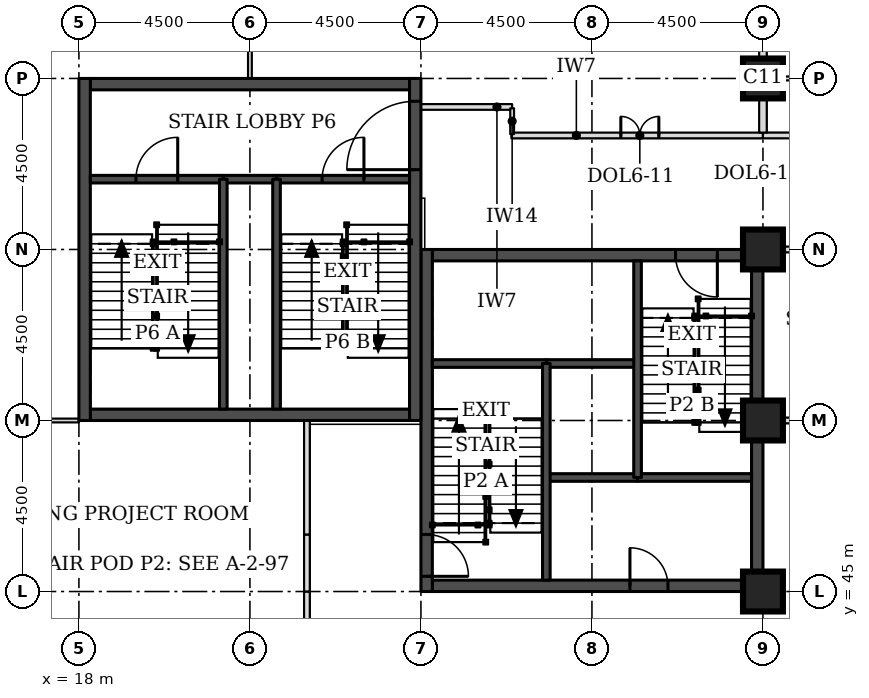
"""IFC4 building model, lengths in metres.
Left out: names, types, materials, properties, quantities, classifications, styles, units other than length and angle.
Written with IfcOpenShell. Run it as: python <this file> out.ifc"""

import sys

from ifc_helpers import new_model, si_unit, direction, frame, frame_2d, origin, origin_2d, place, context, subcontext, project, spatial, rectangle, extrude, element, fill, save


model = new_model("IFC4")
c1 = context("Model", 3, precision=1e-05, world=origin(), true_north=direction((0.0, 1.0)))
c2 = subcontext(c1, "Body", "Model", "MODEL_VIEW")
j1 = project(units=[si_unit("LENGTHUNIT", "METRE"), si_unit("PLANEANGLEUNIT", "RADIAN")], contexts=[c1])
p1 = place(None, origin())
s1 = spatial("IfcSite", under=j1, at=p1, CompositionType="ELEMENT")
p2 = place(p1, origin())
s2 = spatial("IfcBuilding", under=s1, at=p2, CompositionType="ELEMENT")
p3 = place(p2, frame((0.0, 0.0, 119.6)))
s3 = spatial("IfcBuildingStorey", under=s2, at=p3, CompositionType="ELEMENT", Elevation=119.6)
for number, where, z_axis, x_axis in (
    (1, (36.0, 45.0, 0.0), (0.0, 0.0, 1.0), (1.0, 0.0, 0.0)),
    (2, (36.0, 49.5, 0.0), (0.0, 0.0, 1.0), (1.0, 0.0, 0.0)),
    (3, (36.0, 54.0, 0.0), (0.0, 0.0, 1.0), (1.0, 0.0, 0.0)),
    (4, (36.0, 58.5, 0.0), (0.0, 0.0, 1.0), (1.0, 0.0, 0.0)),
):
    element("IfcColumn", number, at=place(p3, frame(where, z_axis=z_axis, x_axis=x_axis)), inside=s3, PredefinedType="COLUMN", context=c2, shape_type="SweptSolid", body=[
        extrude(rectangle(XDim=1.05, YDim=1.05, at=origin_2d()), origin(), (0.0, 0.0, 1.0), 3.7),
    ])
p4 = place(p3, frame((27.3, 45.15, 0.0), z_axis=(0.0, 0.0, 1.0), x_axis=(1.0, 0.0, 0.0)))
e5 = element("IfcWall", 5, at=p4, inside=s3, PredefinedType="SHEAR", context=c2, shape_type="SweptSolid", body=[
    extrude(rectangle(XDim=8.4, YDim=0.3, at=frame_2d((4.2, 0.0))), origin(), (0.0, 0.0, 1.0), 3.7),
])
p5 = place(p4, frame((5.2, 0.0, 0.0)))
e6 = element("IfcOpeningElement", 6, at=p5, cuts=e5, PredefinedType="OPENING", context=c2, shape_type="SweptSolid", body=[
    extrude(rectangle(XDim=1.0, YDim=2.1, at=frame_2d((0.5, 1.05))), frame((0.0, 0.16, 0.0), z_axis=(0.0, -1.0, 0.0), x_axis=(1.0, 0.0, 0.0)), (0.0, 0.0, 1.0), 0.32),
])
p6 = place(p3, frame((27.3, 53.85, 0.0), z_axis=(0.0, 0.0, 1.0), x_axis=(1.0, 0.0, 0.0)))
e7 = element("IfcWall", 7, at=p6, inside=s3, PredefinedType="SHEAR", context=c2, shape_type="SweptSolid", body=[
    extrude(rectangle(XDim=8.4, YDim=0.3, at=frame_2d((4.2, 0.0))), origin(), (0.0, 0.0, 1.0), 3.7),
])
p7 = place(p6, frame((6.4, 0.0, 0.0)))
e8 = element("IfcOpeningElement", 8, at=p7, cuts=e7, PredefinedType="OPENING", context=c2, shape_type="SweptSolid", body=[
    extrude(rectangle(XDim=1.1, YDim=2.1, at=frame_2d((0.55, 1.05))), frame((0.0, 0.16, 0.0), z_axis=(0.0, -1.0, 0.0), x_axis=(1.0, 0.0, 0.0)), (0.0, 0.0, 1.0), 0.32),
])
p8 = place(p3, frame((27.15, 45.0, 0.0), z_axis=(0.0, 0.0, 1.0), x_axis=(0.0, 1.0, 0.0)))
e9 = element("IfcWall", 9, at=p8, inside=s3, PredefinedType="SHEAR", context=c2, shape_type="SweptSolid", body=[
    extrude(rectangle(XDim=9.0, YDim=0.3, at=frame_2d((4.5, 0.0))), origin(), (0.0, 0.0, 1.0), 3.7),
])
p9 = place(p8, frame((0.4, 0.0, 0.0)))
e10 = element("IfcOpeningElement", 10, at=p9, cuts=e9, PredefinedType="OPENING", context=c2, shape_type="SweptSolid", body=[
    extrude(rectangle(XDim=1.1, YDim=2.1, at=frame_2d((0.55, 1.05))), frame((0.0, 0.16, 0.0), z_axis=(0.0, -1.0, 0.0), x_axis=(1.0, 0.0, 0.0)), (0.0, 0.0, 1.0), 0.32),
])
p10 = place(p3, frame((35.85, 45.0, 0.0), z_axis=(0.0, 0.0, 1.0), x_axis=(0.0, 1.0, 0.0)))
e11 = element("IfcWall", 11, at=p10, inside=s3, PredefinedType="SHEAR", context=c2, shape_type="SweptSolid", body=[
    extrude(rectangle(XDim=9.0, YDim=0.3, at=frame_2d((4.5, 0.0))), origin(), (0.0, 0.0, 1.0), 3.7),
])
for number, where, z_axis, x_axis in (
    (12, (18.3, 49.65, 0.0), (0.0, 0.0, 1.0), (1.0, 0.0, 0.0)),
    (13, (18.3, 58.35, 0.0), (0.0, 0.0, 1.0), (1.0, 0.0, 0.0)),
):
    element("IfcWall", number, at=place(p3, frame(where, z_axis=z_axis, x_axis=x_axis)), inside=s3, PredefinedType="SHEAR", context=c2, shape_type="SweptSolid", body=[
        extrude(rectangle(XDim=8.4, YDim=0.3, at=frame_2d((4.2, 0.0))), origin(), (0.0, 0.0, 1.0), 3.7),
    ])
p11 = place(p3, frame((18.15, 49.5, 0.0), z_axis=(0.0, 0.0, 1.0), x_axis=(0.0, 1.0, 0.0)))
e14 = element("IfcWall", 14, at=p11, inside=s3, PredefinedType="SHEAR", context=c2, shape_type="SweptSolid", body=[
    extrude(rectangle(XDim=9.0, YDim=0.3, at=frame_2d((4.5, 0.0))), origin(), (0.0, 0.0, 1.0), 3.7),
])
p12 = place(p3, frame((26.85, 49.5, 0.0), z_axis=(0.0, 0.0, 1.0), x_axis=(0.0, 1.0, 0.0)))
e15 = element("IfcWall", 15, at=p12, inside=s3, PredefinedType="SHEAR", context=c2, shape_type="SweptSolid", body=[
    extrude(rectangle(XDim=9.0, YDim=0.3, at=frame_2d((4.5, 0.0))), origin(), (0.0, 0.0, 1.0), 3.7),
])
p13 = place(p12, frame((6.6, 0.0, 0.0)))
e16 = element("IfcOpeningElement", 16, at=p13, cuts=e15, PredefinedType="OPENING", context=c2, shape_type="SweptSolid", body=[
    extrude(rectangle(XDim=1.8, YDim=2.1, at=frame_2d((0.9, 1.05))), frame((0.0, 0.16, 0.0), z_axis=(0.0, -1.0, 0.0), x_axis=(1.0, 0.0, 0.0)), (0.0, 0.0, 1.0), 0.32),
])
p14 = place(p3, frame((17.761, 63.751, 0.0), z_axis=(0.0, 0.0, 1.0), x_axis=(-0.707106781187, -0.707106781187, 0.0)))
e17 = element("IfcWall", 17, at=p14, inside=s3, PredefinedType="STANDARD", context=c2, shape_type="SweptSolid", body=[
    extrude(rectangle(XDim=7.089, YDim=0.35, at=frame_2d((3.544, 0.0))), origin(), (0.0, 0.0, 1.0), 3.525),
])
p15 = place(p14, frame((1.894, 0.0, 0.9)))
e18 = element("IfcOpeningElement", 18, at=p15, cuts=e17, PredefinedType="OPENING", context=c2, shape_type="SweptSolid", body=[
    extrude(rectangle(XDim=3.3, YDim=1.9, at=frame_2d((1.65, 0.95))), frame((0.0, 0.185, 0.0), z_axis=(0.0, -1.0, 0.0), x_axis=(1.0, 0.0, 0.0)), (0.0, 0.0, 1.0), 0.37),
])
p16 = place(p3, frame((12.749, 44.761, 0.0), z_axis=(0.0, 0.0, 1.0), x_axis=(0.707106781187, -0.707106781187, 0.0)))
e19 = element("IfcWall", 19, at=p16, inside=s3, PredefinedType="STANDARD", context=c2, shape_type="SweptSolid", body=[
    extrude(rectangle(XDim=7.089, YDim=0.35, at=frame_2d((3.544, 0.0))), origin(), (0.0, 0.0, 1.0), 3.525),
])
p17 = place(p16, frame((1.894, 0.0, 0.9)))
e20 = element("IfcOpeningElement", 20, at=p17, cuts=e19, PredefinedType="OPENING", context=c2, shape_type="SweptSolid", body=[
    extrude(rectangle(XDim=3.3, YDim=1.9, at=frame_2d((1.65, 0.95))), frame((0.0, 0.185, 0.0), z_axis=(0.0, -1.0, 0.0), x_axis=(1.0, 0.0, 0.0)), (0.0, 0.0, 1.0), 0.37),
])
for number, where, z_axis, x_axis in (
    (21, (36.525, 49.5, 0.0), (0.0, 0.0, 1.0), (1.0, 0.0, 0.0)),
    (22, (36.525, 54.0, 0.0), (0.0, 0.0, 1.0), (1.0, 0.0, 0.0)),
):
    element("IfcWall", number, at=place(p3, frame(where, z_axis=z_axis, x_axis=x_axis)), inside=s3, PredefinedType="PARTITIONING", context=c2, shape_type="SweptSolid", body=[
        extrude(rectangle(XDim=5.55, YDim=0.15, at=frame_2d((2.775, 0.0))), origin(), (0.0, 0.0, 1.0), 3.55),
    ])
p18 = place(p3, frame((29.38, 57.0, 0.0), z_axis=(0.0, 0.0, 1.0), x_axis=(1.0, 0.0, 0.0)))
e23 = element("IfcWall", 23, at=p18, inside=s3, PredefinedType="PARTITIONING", context=c2, shape_type="SweptSolid", body=[
    extrude(rectangle(XDim=6.62, YDim=0.15, at=frame_2d((3.31, 0.0))), origin(), (0.0, 0.0, 1.0), 3.55),
])
p19 = place(p18, frame((2.88, 0.0, 0.0)))
e24 = element("IfcOpeningElement", 24, at=p19, cuts=e23, PredefinedType="OPENING", context=c2, shape_type="SweptSolid", body=[
    extrude(rectangle(XDim=1.0, YDim=2.1, at=frame_2d((0.5, 1.05))), frame((0.0, 0.085, 0.0), z_axis=(0.0, -1.0, 0.0), x_axis=(1.0, 0.0, 0.0)), (0.0, 0.0, 1.0), 0.17),
])
p20 = place(p3, frame((36.0, 57.0, 0.0), z_axis=(0.0, 0.0, 1.0), x_axis=(1.0, 0.0, 0.0)))
e25 = element("IfcWall", 25, at=p20, inside=s3, PredefinedType="PARTITIONING", context=c2, shape_type="SweptSolid", body=[
    extrude(rectangle(XDim=6.075, YDim=0.15, at=frame_2d((3.038, 0.0))), origin(), (0.0, 0.0, 1.0), 3.55),
])
p21 = place(p20, frame((2.55, 0.0, 0.0)))
e26 = element("IfcOpeningElement", 26, at=p21, cuts=e25, PredefinedType="OPENING", context=c2, shape_type="SweptSolid", body=[
    extrude(rectangle(XDim=1.0, YDim=2.1, at=frame_2d((0.5, 1.05))), frame((0.0, 0.085, 0.0), z_axis=(0.0, -1.0, 0.0), x_axis=(1.0, 0.0, 0.0)), (0.0, 0.0, 1.0), 0.17),
])
p22 = place(p3, frame((36.525, 58.5, 0.0), z_axis=(0.0, 0.0, 1.0), x_axis=(1.0, 0.0, 0.0)))
e27 = element("IfcWall", 27, at=p22, inside=s3, PredefinedType="PARTITIONING", context=c2, shape_type="SweptSolid", body=[
    extrude(rectangle(XDim=2.525, YDim=0.1, at=frame_2d((1.263, 0.0))), origin(), (0.0, 0.0, 1.0), 3.55),
])
p23 = place(p22, frame((0.8, 0.0, 0.0)))
e28 = element("IfcOpeningElement", 28, at=p23, cuts=e27, PredefinedType="OPENING", context=c2, shape_type="SweptSolid", body=[
    extrude(rectangle(XDim=0.9, YDim=2.1, at=frame_2d((0.45, 1.05))), frame((0.0, 0.06, 0.0), z_axis=(0.0, -1.0, 0.0), x_axis=(1.0, 0.0, 0.0)), (0.0, 0.0, 1.0), 0.12),
])
p24 = place(p3, frame((24.0, 39.975, 0.0), z_axis=(0.0, 0.0, 1.0), x_axis=(0.0, 1.0, 0.0)))
e29 = element("IfcWall", 29, at=p24, inside=s3, PredefinedType="PARTITIONING", context=c2, shape_type="SweptSolid", body=[
    extrude(rectangle(XDim=5.025, YDim=0.15, at=frame_2d((2.512, 0.0))), origin(), (0.0, 0.0, 1.0), 3.55),
])
p25 = place(p3, frame((24.0, 45.0, 0.0), z_axis=(0.0, 0.0, 1.0), x_axis=(0.0, 1.0, 0.0)))
e30 = element("IfcWall", 30, at=p25, inside=s3, PredefinedType="PARTITIONING", context=c2, shape_type="SweptSolid", body=[
    extrude(rectangle(XDim=1.5, YDim=0.15, at=frame_2d((0.75, 0.0))), origin(), (0.0, 0.0, 1.0), 3.55),
])
p26 = place(p3, frame((24.0, 46.5, 0.0), z_axis=(0.0, 0.0, 1.0), x_axis=(0.0, 1.0, 0.0)))
e31 = element("IfcWall", 31, at=p26, inside=s3, PredefinedType="PARTITIONING", context=c2, shape_type="SweptSolid", body=[
    extrude(rectangle(XDim=3.0, YDim=0.15, at=frame_2d((1.5, 0.0))), origin(), (0.0, 0.0, 1.0), 3.55),
])
p27 = place(p3, frame((36.0, 57.075, 0.0), z_axis=(0.0, 0.0, 1.0), x_axis=(0.0, 1.0, 0.0)))
e32 = element("IfcWall", 32, at=p27, inside=s3, PredefinedType="PARTITIONING", context=c2, shape_type="SweptSolid", body=[
    extrude(rectangle(XDim=0.9, YDim=0.2, at=frame_2d((0.45, 0.0))), origin(), (0.0, 0.0, 1.0), 2.8),
])
p28 = place(p3, frame((36.0, 58.995, 0.0), z_axis=(0.0, 0.0, 1.0), x_axis=(0.0, 1.0, 0.0)))
e33 = element("IfcWall", 33, at=p28, inside=s3, PredefinedType="PARTITIONING", context=c2, shape_type="SweptSolid", body=[
    extrude(rectangle(XDim=3.48, YDim=0.2, at=frame_2d((1.74, 0.0))), origin(), (0.0, 0.0, 1.0), 2.8),
])
p29 = place(p3, frame((22.5, 63.0, 0.0), z_axis=(0.0, 0.0, 1.0), x_axis=(0.0, -1.0, 0.0)))
e34 = element("IfcWall", 34, at=p29, inside=s3, PredefinedType="PARTITIONING", context=c2, shape_type="SweptSolid", body=[
    extrude(rectangle(XDim=4.5, YDim=0.1, at=frame_2d((2.25, 0.0))), origin(), (0.0, 0.0, 1.0), 3.55),
])
p30 = place(p29, frame((1.8, 0.0, 0.0)))
e35 = element("IfcOpeningElement", 35, at=p30, cuts=e34, PredefinedType="OPENING", context=c2, shape_type="SweptSolid", body=[
    extrude(rectangle(XDim=0.9, YDim=2.1, at=frame_2d((0.45, 1.05))), frame((0.0, 0.06, 0.0), z_axis=(0.0, -1.0, 0.0), x_axis=(1.0, 0.0, 0.0)), (0.0, 0.0, 1.0), 0.12),
])
p31 = place(p3, frame((13.5, 49.5, 0.0), z_axis=(0.0, 0.0, 1.0), x_axis=(1.0, 0.0, 0.0)))
e36 = element("IfcWall", 36, at=p31, inside=s3, PredefinedType="PARTITIONING", context=c2, shape_type="SweptSolid", body=[
    extrude(rectangle(XDim=4.5, YDim=0.1, at=frame_2d((2.25, 0.0))), origin(), (0.0, 0.0, 1.0), 3.55),
])
p32 = place(p31, frame((1.8, 0.0, 0.0)))
e37 = element("IfcOpeningElement", 37, at=p32, cuts=e36, PredefinedType="OPENING", context=c2, shape_type="SweptSolid", body=[
    extrude(rectangle(XDim=0.9, YDim=2.1, at=frame_2d((0.45, 1.05))), frame((0.0, 0.06, 0.0), z_axis=(0.0, -1.0, 0.0), x_axis=(1.0, 0.0, 0.0)), (0.0, 0.0, 1.0), 0.12),
])
p33 = place(p3, frame((27.0, 57.75, 0.0), z_axis=(0.0, 0.0, 1.0), x_axis=(1.0, 0.0, 0.0)))
e38 = element("IfcWall", 38, at=p33, inside=s3, PredefinedType="PARTITIONING", context=c2, shape_type="SweptSolid", body=[
    extrude(rectangle(XDim=2.4, YDim=0.15, at=frame_2d((1.2, 0.0))), origin(), (0.0, 0.0, 1.0), 3.55),
])
p34 = place(p3, frame((29.4, 57.715, 0.0), z_axis=(0.0, 0.0, 1.0), x_axis=(0.0, -1.0, 0.0)))
e39 = element("IfcWall", 39, at=p34, inside=s3, PredefinedType="PARTITIONING", context=c2, shape_type="SweptSolid", body=[
    extrude(rectangle(XDim=0.68, YDim=0.1, at=frame_2d((0.34, 0.0))), origin(), (0.0, 0.0, 1.0), 3.55),
])
p35 = place(p3, frame((30.3, 48.0, 0.0), z_axis=(0.0, 0.0, 1.0), x_axis=(1.0, 0.0, 0.0)))
e40 = element("IfcWall", 40, at=p35, inside=s3, PredefinedType="SOLIDWALL", context=c2, shape_type="SweptSolid", body=[
    extrude(rectangle(XDim=2.4, YDim=0.2, at=frame_2d((1.2, 0.0))), origin(), (0.0, 0.0, 1.0), 3.55),
])
p36 = place(p3, frame((32.7, 48.0, 0.0), z_axis=(0.0, 0.0, 1.0), x_axis=(1.0, 0.0, 0.0)))
e41 = element("IfcWall", 41, at=p36, inside=s3, PredefinedType="SOLIDWALL", context=c2, shape_type="SweptSolid", body=[
    extrude(rectangle(XDim=3.0, YDim=0.2, at=frame_2d((1.5, 0.0))), origin(), (0.0, 0.0, 1.0), 3.55),
])
p37 = place(p3, frame((30.3, 51.0, 0.0), z_axis=(0.0, 0.0, 1.0), x_axis=(1.0, 0.0, 0.0)))
e42 = element("IfcWall", 42, at=p37, inside=s3, PredefinedType="SOLIDWALL", context=c2, shape_type="SweptSolid", body=[
    extrude(rectangle(XDim=2.4, YDim=0.2, at=frame_2d((1.2, 0.0))), origin(), (0.0, 0.0, 1.0), 3.7),
])
p38 = place(p3, frame((27.3, 51.0, 0.0), z_axis=(0.0, 0.0, 1.0), x_axis=(1.0, 0.0, 0.0)))
e43 = element("IfcWall", 43, at=p38, inside=s3, PredefinedType="SOLIDWALL", context=c2, shape_type="SweptSolid", body=[
    extrude(rectangle(XDim=3.0, YDim=0.2, at=frame_2d((1.5, 0.0))), origin(), (0.0, 0.0, 1.0), 3.55),
])
for number, where, z_axis, x_axis in (
    (44, (30.3, 45.3, 0.0), (0.0, 0.0, 1.0), (0.0, 1.0, 0.0)),
    (45, (32.7, 48.0, 0.0), (0.0, 0.0, 1.0), (0.0, 1.0, 0.0)),
):
    element("IfcWall", number, at=place(p3, frame(where, z_axis=z_axis, x_axis=x_axis)), inside=s3, PredefinedType="SOLIDWALL", context=c2, shape_type="SweptSolid", body=[
        extrude(rectangle(XDim=5.7, YDim=0.2, at=frame_2d((2.85, 0.0))), origin(), (0.0, 0.0, 1.0), 3.55),
    ])
p39 = place(p3, frame((21.8, 55.85, 0.0), z_axis=(0.0, 0.0, 1.0), x_axis=(1.0, 0.0, 0.0)))
e46 = element("IfcWall", 46, at=p39, inside=s3, PredefinedType="SOLIDWALL", context=c2, shape_type="SweptSolid", body=[
    extrude(rectangle(XDim=1.4, YDim=0.2, at=frame_2d((0.7, 0.0))), origin(), (0.0, 0.0, 1.0), 3.55),
])
p40 = place(p3, frame((18.3, 55.85, 0.0), z_axis=(0.0, 0.0, 1.0), x_axis=(1.0, 0.0, 0.0)))
e47 = element("IfcWall", 47, at=p40, inside=s3, PredefinedType="SOLIDWALL", context=c2, shape_type="SweptSolid", body=[
    extrude(rectangle(XDim=3.5, YDim=0.2, at=frame_2d((1.75, 0.0))), origin(), (0.0, 0.0, 1.0), 3.55),
])
p41 = place(p40, frame((1.2, 0.0, 0.0)))
e48 = element("IfcOpeningElement", 48, at=p41, cuts=e47, PredefinedType="OPENING", context=c2, shape_type="SweptSolid", body=[
    extrude(rectangle(XDim=1.1, YDim=2.1, at=frame_2d((0.55, 1.05))), frame((0.0, 0.11, 0.0), z_axis=(0.0, -1.0, 0.0), x_axis=(1.0, 0.0, 0.0)), (0.0, 0.0, 1.0), 0.22),
])
p42 = place(p3, frame((23.2, 55.85, 0.0), z_axis=(0.0, 0.0, 1.0), x_axis=(1.0, 0.0, 0.0)))
e49 = element("IfcWall", 49, at=p42, inside=s3, PredefinedType="SOLIDWALL", context=c2, shape_type="SweptSolid", body=[
    extrude(rectangle(XDim=3.5, YDim=0.2, at=frame_2d((1.75, 0.0))), origin(), (0.0, 0.0, 1.0), 3.55),
])
p43 = place(p42, frame((1.2, 0.0, 0.0)))
e50 = element("IfcOpeningElement", 50, at=p43, cuts=e49, PredefinedType="OPENING", context=c2, shape_type="SweptSolid", body=[
    extrude(rectangle(XDim=1.1, YDim=2.1, at=frame_2d((0.55, 1.05))), frame((0.0, 0.11, 0.0), z_axis=(0.0, -1.0, 0.0), x_axis=(1.0, 0.0, 0.0)), (0.0, 0.0, 1.0), 0.22),
])
for number, where, z_axis, x_axis in (
    (51, (21.8, 49.8, 0.0), (0.0, 0.0, 1.0), (0.0, 1.0, 0.0)),
    (52, (23.2, 49.8, 0.0), (0.0, 0.0, 1.0), (0.0, 1.0, 0.0)),
):
    element("IfcWall", number, at=place(p3, frame(where, z_axis=z_axis, x_axis=x_axis)), inside=s3, PredefinedType="SOLIDWALL", context=c2, shape_type="SweptSolid", body=[
        extrude(rectangle(XDim=6.05, YDim=0.2, at=frame_2d((3.025, 0.0))), origin(), (0.0, 0.0, 1.0), 3.55),
    ])
p44 = place(p19, origin())
e53 = element("IfcDoor", 53, at=p44, inside=s3, OperationType="DOUBLE_DOOR_SINGLE_SWING", PredefinedType="DOOR", context=c2, shape_type="SweptSolid", body=[
    extrude(rectangle(XDim=1.0, YDim=2.1, at=frame_2d((0.5, 1.05))), frame((0.0, 0.025, 0.0), z_axis=(0.0, -1.0, 0.0), x_axis=(1.0, 0.0, 0.0)), (0.0, 0.0, 1.0), 0.05),
])
fill(e24, e53)
p45 = place(p9, frame((1.1, 0.0, 0.0), z_axis=(0.0, 0.0, 1.0), x_axis=(-1.0, 0.0, 0.0)))
e54 = element("IfcDoor", 54, at=p45, inside=s3, OperationType="SINGLE_SWING_RIGHT", PredefinedType="DOOR", context=c2, shape_type="SweptSolid", body=[
    extrude(rectangle(XDim=1.1, YDim=2.1, at=frame_2d((0.55, 1.05))), frame((0.0, 0.025, 0.0), z_axis=(0.0, -1.0, 0.0), x_axis=(1.0, 0.0, 0.0)), (0.0, 0.0, 1.0), 0.05),
])
fill(e10, e54)
p46 = place(p7, frame((1.1, 0.0, 0.0), z_axis=(0.0, 0.0, 1.0), x_axis=(-1.0, 0.0, 0.0)))
e55 = element("IfcDoor", 55, at=p46, inside=s3, OperationType="SINGLE_SWING_LEFT", PredefinedType="DOOR", context=c2, shape_type="SweptSolid", body=[
    extrude(rectangle(XDim=1.1, YDim=2.1, at=frame_2d((0.55, 1.05))), frame((0.0, 0.025, 0.0), z_axis=(0.0, -1.0, 0.0), x_axis=(1.0, 0.0, 0.0)), (0.0, 0.0, 1.0), 0.05),
])
fill(e8, e55)
p47 = place(p5, origin())
e56 = element("IfcDoor", 56, at=p47, inside=s3, OperationType="SINGLE_SWING_LEFT", PredefinedType="DOOR", context=c2, shape_type="SweptSolid", body=[
    extrude(rectangle(XDim=1.0, YDim=2.1, at=frame_2d((0.5, 1.05))), frame((0.0, 0.025, 0.0), z_axis=(0.0, -1.0, 0.0), x_axis=(1.0, 0.0, 0.0)), (0.0, 0.0, 1.0), 0.05),
])
fill(e6, e56)
p48 = place(p41, origin())
e57 = element("IfcDoor", 57, at=p48, inside=s3, OperationType="SINGLE_SWING_RIGHT", PredefinedType="DOOR", context=c2, shape_type="SweptSolid", body=[
    extrude(rectangle(XDim=1.1, YDim=2.1, at=frame_2d((0.55, 1.05))), frame((0.0, 0.025, 0.0), z_axis=(0.0, -1.0, 0.0), x_axis=(1.0, 0.0, 0.0)), (0.0, 0.0, 1.0), 0.05),
])
fill(e48, e57)
p49 = place(p43, origin())
e58 = element("IfcDoor", 58, at=p49, inside=s3, OperationType="SINGLE_SWING_RIGHT", PredefinedType="DOOR", context=c2, shape_type="SweptSolid", body=[
    extrude(rectangle(XDim=1.1, YDim=2.1, at=frame_2d((0.55, 1.05))), frame((0.0, 0.025, 0.0), z_axis=(0.0, -1.0, 0.0), x_axis=(1.0, 0.0, 0.0)), (0.0, 0.0, 1.0), 0.05),
])
fill(e50, e58)
p50 = place(p13, origin())
e59 = element("IfcDoor", 59, at=p50, inside=s3, OperationType="SINGLE_SWING_LEFT", PredefinedType="DOOR", context=c2, shape_type="SweptSolid", body=[
    extrude(rectangle(XDim=1.8, YDim=2.1, at=frame_2d((0.9, 1.05))), frame((0.0, 0.025, 0.0), z_axis=(0.0, -1.0, 0.0), x_axis=(1.0, 0.0, 0.0)), (0.0, 0.0, 1.0), 0.05),
])
fill(e16, e59)
save(model, sys.argv[1])
